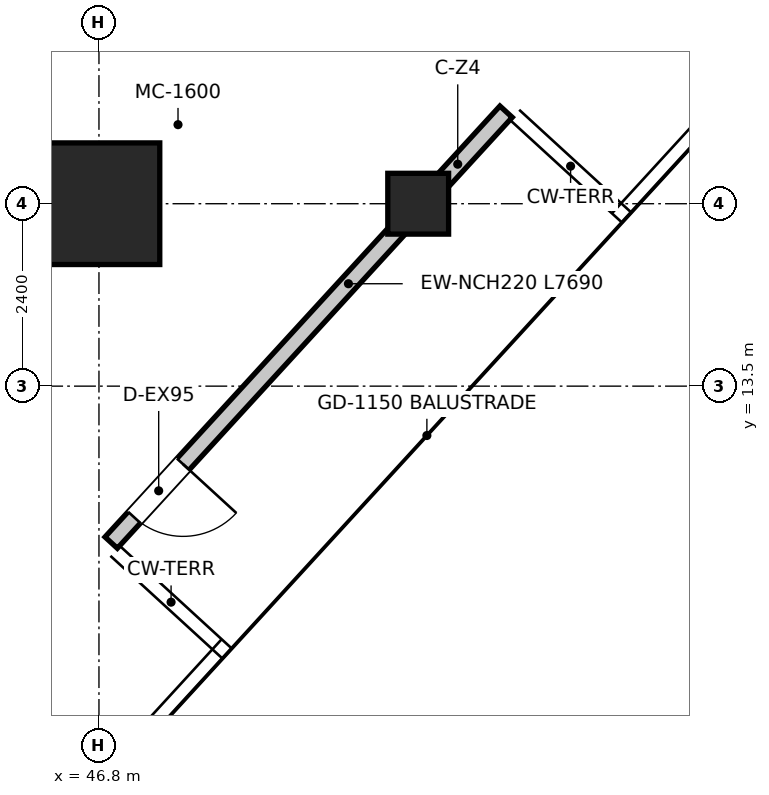
"""IFC4 building model, lengths in metres.
Left out: names, types, materials, properties, quantities, classifications, styles, units other than length and angle.
Written with IfcOpenShell. Run it as: python <this file> out.ifc"""

import sys

from ifc_helpers import new_model, si_unit, direction, frame, frame_2d, origin, origin_2d, place, context, subcontext, project, spatial, rectangle, extrude, source, transform, mapped, element, fill, save


model = new_model("IFC4")
c1 = context("Model", 3, precision=1e-05, world=origin(), true_north=direction((0.0, 1.0)))
c2 = subcontext(c1, "Body", "Model", "MODEL_VIEW")
j1 = project(units=[si_unit("LENGTHUNIT", "METRE"), si_unit("PLANEANGLEUNIT", "RADIAN")], contexts=[c1])
p1 = place(None, origin())
s1 = spatial("IfcSite", under=j1, at=p1, CompositionType="ELEMENT")
p2 = place(p1, origin())
s2 = spatial("IfcBuilding", under=s1, at=p2, CompositionType="ELEMENT")
p3 = place(p2, frame((0.0, 0.0, 219.15)))
s3 = spatial("IfcBuildingStorey", under=s2, at=p3, CompositionType="ELEMENT", Elevation=219.15)
m1 = source(origin(), c2, "Body", "SweptSolid", [
    extrude(rectangle(XDim=1.6, YDim=1.6, at=origin_2d()), origin(), (0.0, 0.0, 1.0), 3.95),
])
p4 = place(p3, frame((46.8, 15.9, 0.0), z_axis=(0.0, 0.0, 1.0), x_axis=(1.0, 0.0, 0.0)))
e1 = element("IfcColumn", 1, at=p4, inside=s3, PredefinedType="USERDEFINED", context=c2, shape_type="MappedRepresentation", body=[
    mapped(m1, transform((0.0, 0.0, 0.0), x_axis=(1.0, 0.0, 0.0), y_axis=(0.0, 1.0, 0.0), z_axis=(0.0, 0.0, 1.0), scale=1.0)),
])
m2 = source(origin(), c2, "Body", "SweptSolid", [
    extrude(rectangle(XDim=0.8, YDim=0.8, at=origin_2d()), origin(), (0.0, 0.0, 1.0), 3.95),
])
p5 = place(p3, frame((51.0, 15.9, 0.0), z_axis=(0.0, 0.0, 1.0), x_axis=(1.0, 0.0, 0.0)))
e2 = element("IfcColumn", 2, at=p5, inside=s3, PredefinedType="COLUMN", context=c2, shape_type="MappedRepresentation", body=[
    mapped(m2, transform((0.0, 0.0, 0.0), x_axis=(1.0, 0.0, 0.0), y_axis=(0.0, 1.0, 0.0), z_axis=(0.0, 0.0, 1.0), scale=1.0)),
])
p6 = place(p3, frame((52.156, 17.111, 0.0), z_axis=(0.0, 0.0, 1.0), x_axis=(-0.675590917682, -0.737276686153, 0.0)))
e3 = element("IfcWall", 3, at=p6, inside=s3, PredefinedType="ELEMENTEDWALL", context=c2, shape_type="SweptSolid", body=[
    extrude(rectangle(XDim=7.69, YDim=0.22, at=frame_2d((3.845, 0.0))), origin(), (0.0, 0.0, 1.0), 3.18),
])
p7 = place(p6, frame((6.29, 0.0, 0.0)))
e4 = element("IfcOpeningElement", 4, at=p7, cuts=e3, PredefinedType="OPENING", context=c2, shape_type="SweptSolid", body=[
    extrude(rectangle(XDim=0.95, YDim=2.1, at=frame_2d((0.475, 1.05))), frame((0.0, 0.12, 0.0), z_axis=(0.0, -1.0, 0.0), x_axis=(1.0, 0.0, 0.0)), (0.0, 0.0, 1.0), 0.24),
])
p8 = place(p7, origin())
e5 = element("IfcDoor", 5, at=p8, inside=s3, OperationType="SINGLE_SWING_LEFT", PredefinedType="DOOR", context=c2, shape_type="SweptSolid", body=[
    extrude(rectangle(XDim=0.95, YDim=2.1, at=frame_2d((0.475, 1.05))), frame((0.0, 0.025, 0.0), z_axis=(0.0, -1.0, 0.0), x_axis=(1.0, 0.0, 0.0)), (0.0, 0.0, 1.0), 0.05),
])
fill(e4, e5)
save(model, sys.argv[1])
